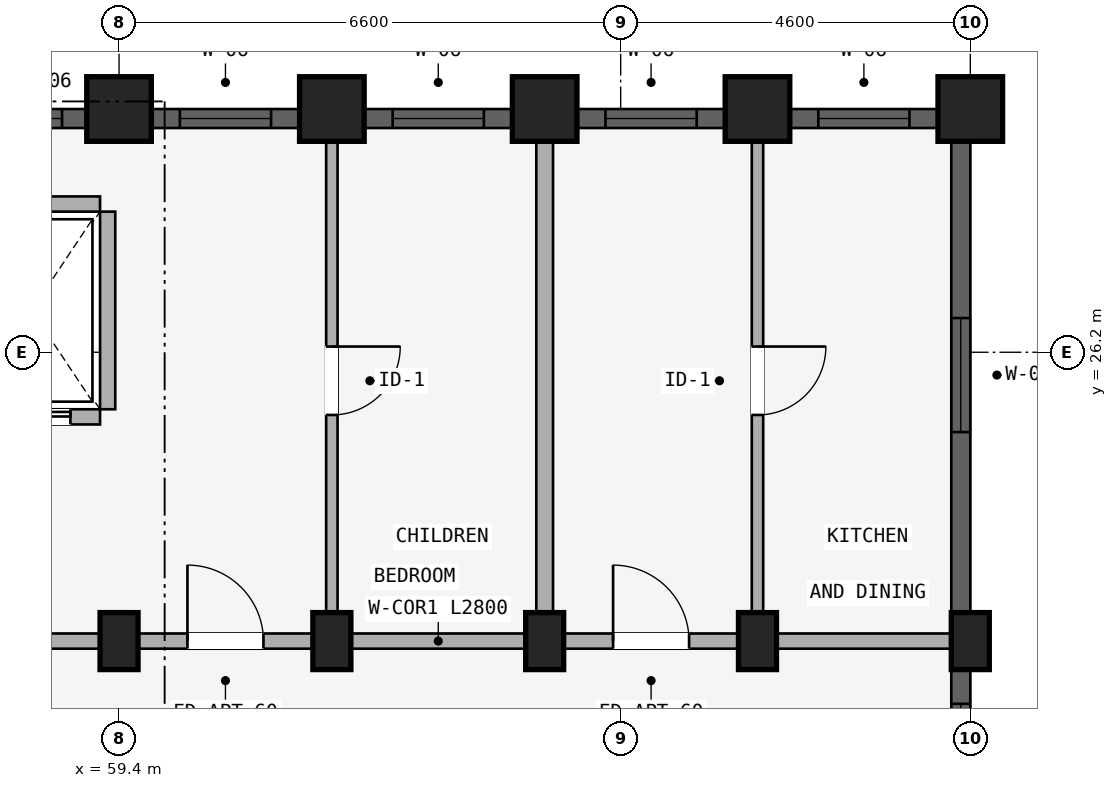
"""IFC4 building model, lengths in metres.
Left out: names, types, materials, properties, quantities, classifications, styles, units other than length and angle.
Written with IfcOpenShell. Run it as: python <this file> out.ifc"""

import sys

from ifc_helpers import new_model, si_unit, direction, frame, frame_2d, origin, origin_2d, place, context, subcontext, project, spatial, rectangle, extrude, element, fill, save


model = new_model("IFC4")
c1 = context("Model", 3, precision=1e-05, world=origin(), true_north=direction((0.0, 1.0)))
c2 = subcontext(c1, "Body", "Model", "MODEL_VIEW")
j1 = project(units=[si_unit("LENGTHUNIT", "METRE"), si_unit("PLANEANGLEUNIT", "RADIAN")], contexts=[c1])
p1 = place(None, origin())
s1 = spatial("IfcSite", under=j1, at=p1, CompositionType="ELEMENT")
p2 = place(p1, origin())
s2 = spatial("IfcBuilding", under=s1, at=p2, CompositionType="ELEMENT")
p3 = place(p2, frame((0.0, 0.0, 4.5)))
s3 = spatial("IfcBuildingStorey", under=s2, at=p3, CompositionType="ELEMENT", Elevation=4.5)
p4 = place(p3, frame((59.4, 29.4, 0.0), z_axis=(0.0, 0.0, 1.0), x_axis=(1.0, 0.0, 0.0)))
e1 = element("IfcColumn", 1, at=p4, inside=s3, PredefinedType="COLUMN", context=c2, shape_type="SweptSolid", body=[
    extrude(rectangle(XDim=0.85, YDim=0.85, at=origin_2d()), origin(), (0.0, 0.0, 1.0), 3.98),
])
p5 = place(p3, frame((59.4, 22.4, 0.0), z_axis=(0.0, 0.0, 1.0), x_axis=(1.0, 0.0, 0.0)))
e2 = element("IfcColumn", 2, at=p5, inside=s3, PredefinedType="COLUMN", context=c2, shape_type="SweptSolid", body=[
    extrude(rectangle(XDim=0.5, YDim=0.75, at=origin_2d()), origin(), (0.0, 0.0, 1.0), 3.98),
])
p6 = place(p3, frame((62.2, 29.4, 0.0), z_axis=(0.0, 0.0, 1.0), x_axis=(1.0, 0.0, 0.0)))
e3 = element("IfcColumn", 3, at=p6, inside=s3, PredefinedType="COLUMN", context=c2, shape_type="SweptSolid", body=[
    extrude(rectangle(XDim=0.85, YDim=0.85, at=origin_2d()), origin(), (0.0, 0.0, 1.0), 3.98),
])
p7 = place(p3, frame((62.2, 22.4, 0.0), z_axis=(0.0, 0.0, 1.0), x_axis=(1.0, 0.0, 0.0)))
e4 = element("IfcColumn", 4, at=p7, inside=s3, PredefinedType="COLUMN", context=c2, shape_type="SweptSolid", body=[
    extrude(rectangle(XDim=0.5, YDim=0.75, at=origin_2d()), origin(), (0.0, 0.0, 1.0), 3.98),
])
p8 = place(p3, frame((65.0, 29.4, 0.0), z_axis=(0.0, 0.0, 1.0), x_axis=(1.0, 0.0, 0.0)))
e5 = element("IfcColumn", 5, at=p8, inside=s3, PredefinedType="COLUMN", context=c2, shape_type="SweptSolid", body=[
    extrude(rectangle(XDim=0.85, YDim=0.85, at=origin_2d()), origin(), (0.0, 0.0, 1.0), 3.98),
])
p9 = place(p3, frame((65.0, 22.4, 0.0), z_axis=(0.0, 0.0, 1.0), x_axis=(1.0, 0.0, 0.0)))
e6 = element("IfcColumn", 6, at=p9, inside=s3, PredefinedType="COLUMN", context=c2, shape_type="SweptSolid", body=[
    extrude(rectangle(XDim=0.5, YDim=0.75, at=origin_2d()), origin(), (0.0, 0.0, 1.0), 3.98),
])
p10 = place(p3, frame((67.8, 29.4, 0.0), z_axis=(0.0, 0.0, 1.0), x_axis=(1.0, 0.0, 0.0)))
e7 = element("IfcColumn", 7, at=p10, inside=s3, PredefinedType="COLUMN", context=c2, shape_type="SweptSolid", body=[
    extrude(rectangle(XDim=0.85, YDim=0.85, at=origin_2d()), origin(), (0.0, 0.0, 1.0), 3.98),
])
p11 = place(p3, frame((67.8, 22.4, 0.0), z_axis=(0.0, 0.0, 1.0), x_axis=(1.0, 0.0, 0.0)))
e8 = element("IfcColumn", 8, at=p11, inside=s3, PredefinedType="COLUMN", context=c2, shape_type="SweptSolid", body=[
    extrude(rectangle(XDim=0.5, YDim=0.75, at=origin_2d()), origin(), (0.0, 0.0, 1.0), 3.98),
])
p12 = place(p3, frame((70.6, 29.4, 0.0), z_axis=(0.0, 0.0, 1.0), x_axis=(1.0, 0.0, 0.0)))
e9 = element("IfcColumn", 9, at=p12, inside=s3, PredefinedType="COLUMN", context=c2, shape_type="SweptSolid", body=[
    extrude(rectangle(XDim=0.85, YDim=0.85, at=origin_2d()), origin(), (0.0, 0.0, 1.0), 3.98),
])
p13 = place(p3, frame((70.6, 22.4, 0.0), z_axis=(0.0, 0.0, 1.0), x_axis=(1.0, 0.0, 0.0)))
e10 = element("IfcColumn", 10, at=p13, inside=s3, PredefinedType="COLUMN", context=c2, shape_type="SweptSolid", body=[
    extrude(rectangle(XDim=0.5, YDim=0.75, at=origin_2d()), origin(), (0.0, 0.0, 1.0), 3.98),
])
p14 = place(p3, frame((59.25, 28.05, 0.0), z_axis=(0.0, 0.0, 1.0), x_axis=(0.0, -1.0, 0.0)))
e11 = element("IfcWall", 11, at=p14, inside=s3, PredefinedType="STANDARD", context=c2, shape_type="SweptSolid", body=[
    extrude(rectangle(XDim=2.6, YDim=0.2, at=frame_2d((1.3, 0.0))), origin(), (0.0, 0.0, 1.0), 3.322),
])
p15 = place(p3, frame((57.35, 28.15, 0.0), z_axis=(0.0, 0.0, 1.0), x_axis=(1.0, 0.0, 0.0)))
e12 = element("IfcWall", 12, at=p15, inside=s3, PredefinedType="STANDARD", context=c2, shape_type="SweptSolid", body=[
    extrude(rectangle(XDim=1.8, YDim=0.2, at=frame_2d((0.9, 0.0))), origin(), (0.0, 0.0, 1.0), 3.98),
])
p16 = place(p3, frame((57.35, 25.35, 0.0), z_axis=(0.0, 0.0, 1.0), x_axis=(1.0, 0.0, 0.0)))
e13 = element("IfcWall", 13, at=p16, inside=s3, PredefinedType="STANDARD", context=c2, shape_type="SweptSolid", body=[
    extrude(rectangle(XDim=1.8, YDim=0.2, at=frame_2d((0.9, 0.0))), origin(), (0.0, 0.0, 1.0), 3.98),
])
p17 = place(p16, frame((0.39, 0.0, 0.0)))
e14 = element("IfcOpeningElement", 14, at=p17, cuts=e13, PredefinedType="OPENING", context=c2, shape_type="SweptSolid", body=[
    extrude(rectangle(XDim=1.02, YDim=2.15, at=frame_2d((0.51, 1.075))), frame((0.0, 0.11, 0.0), z_axis=(0.0, -1.0, 0.0), x_axis=(1.0, 0.0, 0.0)), (0.0, 0.0, 1.0), 0.22),
])
p18 = place(p3, frame((53.75, 22.4, 0.0), z_axis=(0.0, 0.0, 1.0), x_axis=(1.0, 0.0, 0.0)))
e15 = element("IfcWall", 15, at=p18, inside=s3, PredefinedType="STANDARD", context=c2, shape_type="SweptSolid", body=[
    extrude(rectangle(XDim=5.6, YDim=0.2, at=frame_2d((2.8, 0.0))), origin(), (0.0, 0.0, 1.0), 3.322),
])
p19 = place(p18, frame((1.91, 0.0, 0.0)))
e16 = element("IfcOpeningElement", 16, at=p19, cuts=e15, PredefinedType="OPENING", context=c2, shape_type="SweptSolid", body=[
    extrude(rectangle(XDim=1.22, YDim=2.15, at=frame_2d((0.61, 1.075))), frame((0.0, 0.11, 0.0), z_axis=(0.0, -1.0, 0.0), x_axis=(1.0, 0.0, 0.0)), (0.0, 0.0, 1.0), 0.22),
])
p20 = place(p3, frame((59.4, 22.4, 0.0), z_axis=(0.0, 0.0, 1.0), x_axis=(1.0, 0.0, 0.0)))
e17 = element("IfcWall", 17, at=p20, inside=s3, PredefinedType="STANDARD", context=c2, shape_type="SweptSolid", body=[
    extrude(rectangle(XDim=2.8, YDim=0.2, at=frame_2d((1.4, 0.0))), origin(), (0.0, 0.0, 1.0), 3.322),
])
p21 = place(p20, frame((0.9, 0.0, 0.0)))
e18 = element("IfcOpeningElement", 18, at=p21, cuts=e17, PredefinedType="OPENING", context=c2, shape_type="SweptSolid", body=[
    extrude(rectangle(XDim=1.0, YDim=2.15, at=frame_2d((0.5, 1.075))), frame((0.0, 0.11, 0.0), z_axis=(0.0, -1.0, 0.0), x_axis=(1.0, 0.0, 0.0)), (0.0, 0.0, 1.0), 0.22),
])
p22 = place(p3, frame((62.2, 22.4, 0.0), z_axis=(0.0, 0.0, 1.0), x_axis=(1.0, 0.0, 0.0)))
e19 = element("IfcWall", 19, at=p22, inside=s3, PredefinedType="STANDARD", context=c2, shape_type="SweptSolid", body=[
    extrude(rectangle(XDim=2.8, YDim=0.2, at=frame_2d((1.4, 0.0))), origin(), (0.0, 0.0, 1.0), 3.322),
])
p23 = place(p3, frame((65.0, 22.4, 0.0), z_axis=(0.0, 0.0, 1.0), x_axis=(1.0, 0.0, 0.0)))
e20 = element("IfcWall", 20, at=p23, inside=s3, PredefinedType="STANDARD", context=c2, shape_type="SweptSolid", body=[
    extrude(rectangle(XDim=2.8, YDim=0.2, at=frame_2d((1.4, 0.0))), origin(), (0.0, 0.0, 1.0), 3.322),
])
p24 = place(p23, frame((0.9, 0.0, 0.0)))
e21 = element("IfcOpeningElement", 21, at=p24, cuts=e20, PredefinedType="OPENING", context=c2, shape_type="SweptSolid", body=[
    extrude(rectangle(XDim=1.0, YDim=2.15, at=frame_2d((0.5, 1.075))), frame((0.0, 0.11, 0.0), z_axis=(0.0, -1.0, 0.0), x_axis=(1.0, 0.0, 0.0)), (0.0, 0.0, 1.0), 0.22),
])
p25 = place(p3, frame((67.8, 22.4, 0.0), z_axis=(0.0, 0.0, 1.0), x_axis=(1.0, 0.0, 0.0)))
e22 = element("IfcWall", 22, at=p25, inside=s3, PredefinedType="STANDARD", context=c2, shape_type="SweptSolid", body=[
    extrude(rectangle(XDim=2.8, YDim=0.2, at=frame_2d((1.4, 0.0))), origin(), (0.0, 0.0, 1.0), 3.322),
])
p26 = place(p3, frame((62.2, 29.2, 0.0), z_axis=(0.0, 0.0, 1.0), x_axis=(0.0, -1.0, 0.0)))
e23 = element("IfcWall", 23, at=p26, inside=s3, PredefinedType="PARTITIONING", context=c2, shape_type="SweptSolid", body=[
    extrude(rectangle(XDim=6.75, YDim=0.15, at=frame_2d((3.375, 0.0))), origin(), (0.0, 0.0, 1.0), 3.322),
])
p27 = place(p26, frame((2.925, 0.0, 0.0)))
e24 = element("IfcOpeningElement", 24, at=p27, cuts=e23, PredefinedType="OPENING", context=c2, shape_type="SweptSolid", body=[
    extrude(rectangle(XDim=0.9, YDim=2.1, at=frame_2d((0.45, 1.05))), frame((0.0, 0.085, 0.0), z_axis=(0.0, -1.0, 0.0), x_axis=(1.0, 0.0, 0.0)), (0.0, 0.0, 1.0), 0.17),
])
p28 = place(p3, frame((65.0, 29.2, 0.0), z_axis=(0.0, 0.0, 1.0), x_axis=(0.0, -1.0, 0.0)))
e25 = element("IfcWall", 25, at=p28, inside=s3, PredefinedType="STANDARD", context=c2, shape_type="SweptSolid", body=[
    extrude(rectangle(XDim=6.75, YDim=0.22, at=frame_2d((3.375, 0.0))), origin(), (0.0, 0.0, 1.0), 3.322),
])
p29 = place(p3, frame((67.8, 29.2, 0.0), z_axis=(0.0, 0.0, 1.0), x_axis=(0.0, -1.0, 0.0)))
e26 = element("IfcWall", 26, at=p29, inside=s3, PredefinedType="PARTITIONING", context=c2, shape_type="SweptSolid", body=[
    extrude(rectangle(XDim=6.75, YDim=0.15, at=frame_2d((3.375, 0.0))), origin(), (0.0, 0.0, 1.0), 3.322),
])
p30 = place(p29, frame((2.925, 0.0, 0.0)))
e27 = element("IfcOpeningElement", 27, at=p30, cuts=e26, PredefinedType="OPENING", context=c2, shape_type="SweptSolid", body=[
    extrude(rectangle(XDim=0.9, YDim=2.1, at=frame_2d((0.45, 1.05))), frame((0.0, 0.085, 0.0), z_axis=(0.0, -1.0, 0.0), x_axis=(1.0, 0.0, 0.0)), (0.0, 0.0, 1.0), 0.17),
])
p31 = place(p3, frame((56.628, 29.275, 0.0), z_axis=(0.0, 0.0, 1.0), x_axis=(1.0, 0.0, 0.0)))
e28 = element("IfcWall", 28, at=p31, inside=s3, PredefinedType="STANDARD", context=c2, shape_type="SweptSolid", body=[
    extrude(rectangle(XDim=2.422, YDim=0.25, at=frame_2d((1.211, 0.0))), origin(), (0.0, 0.0, 1.0), 3.522),
])
p32 = place(p31, frame((0.822, 0.0, 0.88)))
e29 = element("IfcOpeningElement", 29, at=p32, cuts=e28, PredefinedType="OPENING", context=c2, shape_type="SweptSolid", body=[
    extrude(rectangle(XDim=1.2, YDim=1.5, at=frame_2d((0.6, 0.75))), frame((0.0, 0.135, 0.0), z_axis=(0.0, -1.0, 0.0), x_axis=(1.0, 0.0, 0.0)), (0.0, 0.0, 1.0), 0.27),
])
p33 = place(p3, frame((59.82, 29.275, 0.0), z_axis=(0.0, 0.0, 1.0), x_axis=(1.0, 0.0, 0.0)))
e30 = element("IfcWall", 30, at=p33, inside=s3, PredefinedType="STANDARD", context=c2, shape_type="SweptSolid", body=[
    extrude(rectangle(XDim=1.96, YDim=0.25, at=frame_2d((0.98, 0.0))), origin(), (0.0, 0.0, 1.0), 3.522),
])
p34 = place(p33, frame((0.38, 0.0, 0.88)))
e31 = element("IfcOpeningElement", 31, at=p34, cuts=e30, PredefinedType="OPENING", context=c2, shape_type="SweptSolid", body=[
    extrude(rectangle(XDim=1.2, YDim=1.5, at=frame_2d((0.6, 0.75))), frame((0.0, 0.135, 0.0), z_axis=(0.0, -1.0, 0.0), x_axis=(1.0, 0.0, 0.0)), (0.0, 0.0, 1.0), 0.27),
])
p35 = place(p3, frame((62.62, 29.275, 0.0), z_axis=(0.0, 0.0, 1.0), x_axis=(1.0, 0.0, 0.0)))
e32 = element("IfcWall", 32, at=p35, inside=s3, PredefinedType="STANDARD", context=c2, shape_type="SweptSolid", body=[
    extrude(rectangle(XDim=1.96, YDim=0.25, at=frame_2d((0.98, 0.0))), origin(), (0.0, 0.0, 1.0), 3.522),
])
p36 = place(p35, frame((0.38, 0.0, 0.88)))
e33 = element("IfcOpeningElement", 33, at=p36, cuts=e32, PredefinedType="OPENING", context=c2, shape_type="SweptSolid", body=[
    extrude(rectangle(XDim=1.2, YDim=1.5, at=frame_2d((0.6, 0.75))), frame((0.0, 0.135, 0.0), z_axis=(0.0, -1.0, 0.0), x_axis=(1.0, 0.0, 0.0)), (0.0, 0.0, 1.0), 0.27),
])
p37 = place(p3, frame((65.42, 29.275, 0.0), z_axis=(0.0, 0.0, 1.0), x_axis=(1.0, 0.0, 0.0)))
e34 = element("IfcWall", 34, at=p37, inside=s3, PredefinedType="STANDARD", context=c2, shape_type="SweptSolid", body=[
    extrude(rectangle(XDim=1.96, YDim=0.25, at=frame_2d((0.98, 0.0))), origin(), (0.0, 0.0, 1.0), 3.522),
])
p38 = place(p37, frame((0.38, 0.0, 0.88)))
e35 = element("IfcOpeningElement", 35, at=p38, cuts=e34, PredefinedType="OPENING", context=c2, shape_type="SweptSolid", body=[
    extrude(rectangle(XDim=1.2, YDim=1.5, at=frame_2d((0.6, 0.75))), frame((0.0, 0.135, 0.0), z_axis=(0.0, -1.0, 0.0), x_axis=(1.0, 0.0, 0.0)), (0.0, 0.0, 1.0), 0.27),
])
p39 = place(p3, frame((68.22, 29.275, 0.0), z_axis=(0.0, 0.0, 1.0), x_axis=(1.0, 0.0, 0.0)))
e36 = element("IfcWall", 36, at=p39, inside=s3, PredefinedType="STANDARD", context=c2, shape_type="SweptSolid", body=[
    extrude(rectangle(XDim=1.96, YDim=0.25, at=frame_2d((0.98, 0.0))), origin(), (0.0, 0.0, 1.0), 3.522),
])
p40 = place(p39, frame((0.38, 0.0, 0.88)))
e37 = element("IfcOpeningElement", 37, at=p40, cuts=e36, PredefinedType="OPENING", context=c2, shape_type="SweptSolid", body=[
    extrude(rectangle(XDim=1.2, YDim=1.5, at=frame_2d((0.6, 0.75))), frame((0.0, 0.135, 0.0), z_axis=(0.0, -1.0, 0.0), x_axis=(1.0, 0.0, 0.0)), (0.0, 0.0, 1.0), 0.27),
])
p41 = place(p3, frame((70.475, 28.98, 0.0), z_axis=(0.0, 0.0, 1.0), x_axis=(0.0, -1.0, 0.0)))
e38 = element("IfcWall", 38, at=p41, inside=s3, PredefinedType="STANDARD", context=c2, shape_type="SweptSolid", body=[
    extrude(rectangle(XDim=6.201, YDim=0.25, at=frame_2d((3.101, 0.0))), origin(), (0.0, 0.0, 1.0), 3.322),
])
p42 = place(p41, frame((2.33, 0.0, 0.88)))
e39 = element("IfcOpeningElement", 39, at=p42, cuts=e38, PredefinedType="OPENING", context=c2, shape_type="SweptSolid", body=[
    extrude(rectangle(XDim=1.5, YDim=1.65, at=frame_2d((0.75, 0.825))), frame((0.0, 0.135, 0.0), z_axis=(0.0, -1.0, 0.0), x_axis=(1.0, 0.0, 0.0)), (0.0, 0.0, 1.0), 0.27),
])
p43 = place(p3, frame((70.475, 22.021, 0.0), z_axis=(0.0, 0.0, 1.0), x_axis=(0.0, -1.0, 0.0)))
e40 = element("IfcWall", 40, at=p43, inside=s3, PredefinedType="STANDARD", context=c2, shape_type="SweptSolid", body=[
    extrude(rectangle(XDim=1.643, YDim=0.25, at=frame_2d((0.822, 0.0))), origin(), (0.0, 0.0, 1.0), 3.322),
])
p44 = place(p43, frame((0.447, 0.0, 0.88)))
e41 = element("IfcOpeningElement", 41, at=p44, cuts=e40, PredefinedType="OPENING", context=c2, shape_type="SweptSolid", body=[
    extrude(rectangle(XDim=0.75, YDim=1.05, at=frame_2d((0.375, 0.525))), frame((0.0, 0.135, 0.0), z_axis=(0.0, -1.0, 0.0), x_axis=(1.0, 0.0, 0.0)), (0.0, 0.0, 1.0), 0.27),
])
p45 = place(p32, origin())
e42 = element("IfcWindow", 42, at=p45, inside=s3, PartitioningType="SINGLE_PANEL", PredefinedType="WINDOW", context=c2, shape_type="SweptSolid", body=[
    extrude(rectangle(XDim=1.2, YDim=1.5, at=frame_2d((0.6, 0.75))), frame((0.0, 0.03, 0.0), z_axis=(0.0, -1.0, 0.0), x_axis=(1.0, 0.0, 0.0)), (0.0, 0.0, 1.0), 0.06),
])
fill(e29, e42)
p46 = place(p34, origin())
e43 = element("IfcWindow", 43, at=p46, inside=s3, PartitioningType="SINGLE_PANEL", PredefinedType="WINDOW", context=c2, shape_type="SweptSolid", body=[
    extrude(rectangle(XDim=1.2, YDim=1.5, at=frame_2d((0.6, 0.75))), frame((0.0, 0.03, 0.0), z_axis=(0.0, -1.0, 0.0), x_axis=(1.0, 0.0, 0.0)), (0.0, 0.0, 1.0), 0.06),
])
fill(e31, e43)
p47 = place(p36, origin())
e44 = element("IfcWindow", 44, at=p47, inside=s3, PartitioningType="SINGLE_PANEL", PredefinedType="WINDOW", context=c2, shape_type="SweptSolid", body=[
    extrude(rectangle(XDim=1.2, YDim=1.5, at=frame_2d((0.6, 0.75))), frame((0.0, 0.03, 0.0), z_axis=(0.0, -1.0, 0.0), x_axis=(1.0, 0.0, 0.0)), (0.0, 0.0, 1.0), 0.06),
])
fill(e33, e44)
p48 = place(p38, origin())
e45 = element("IfcWindow", 45, at=p48, inside=s3, PartitioningType="SINGLE_PANEL", PredefinedType="WINDOW", context=c2, shape_type="SweptSolid", body=[
    extrude(rectangle(XDim=1.2, YDim=1.5, at=frame_2d((0.6, 0.75))), frame((0.0, 0.03, 0.0), z_axis=(0.0, -1.0, 0.0), x_axis=(1.0, 0.0, 0.0)), (0.0, 0.0, 1.0), 0.06),
])
fill(e35, e45)
p49 = place(p40, origin())
e46 = element("IfcWindow", 46, at=p49, inside=s3, PartitioningType="SINGLE_PANEL", PredefinedType="WINDOW", context=c2, shape_type="SweptSolid", body=[
    extrude(rectangle(XDim=1.2, YDim=1.5, at=frame_2d((0.6, 0.75))), frame((0.0, 0.03, 0.0), z_axis=(0.0, -1.0, 0.0), x_axis=(1.0, 0.0, 0.0)), (0.0, 0.0, 1.0), 0.06),
])
fill(e37, e46)
p50 = place(p42, origin())
e47 = element("IfcWindow", 47, at=p50, inside=s3, PartitioningType="DOUBLE_PANEL_VERTICAL", PredefinedType="WINDOW", context=c2, shape_type="SweptSolid", body=[
    extrude(rectangle(XDim=1.5, YDim=1.65, at=frame_2d((0.75, 0.825))), frame((0.0, 0.03, 0.0), z_axis=(0.0, -1.0, 0.0), x_axis=(1.0, 0.0, 0.0)), (0.0, 0.0, 1.0), 0.06),
])
fill(e39, e47)
p51 = place(p44, origin())
e48 = element("IfcWindow", 48, at=p51, inside=s3, PartitioningType="SINGLE_PANEL", PredefinedType="WINDOW", context=c2, shape_type="SweptSolid", body=[
    extrude(rectangle(XDim=0.75, YDim=1.05, at=frame_2d((0.375, 0.525))), frame((0.0, 0.03, 0.0), z_axis=(0.0, -1.0, 0.0), x_axis=(1.0, 0.0, 0.0)), (0.0, 0.0, 1.0), 0.06),
])
fill(e41, e48)
p52 = place(p17, origin())
e49 = element("IfcDoor", 49, at=p52, inside=s3, OperationType="SLIDING_TO_RIGHT", PredefinedType="DOOR", context=c2, shape_type="SweptSolid", body=[
    extrude(rectangle(XDim=1.02, YDim=2.15, at=frame_2d((0.51, 1.075))), frame((0.0, 0.025, 0.0), z_axis=(0.0, -1.0, 0.0), x_axis=(1.0, 0.0, 0.0)), (0.0, 0.0, 1.0), 0.05),
])
fill(e14, e49)
p53 = place(p21, origin())
e50 = element("IfcDoor", 50, at=p53, inside=s3, OperationType="SINGLE_SWING_LEFT", PredefinedType="DOOR", context=c2, shape_type="SweptSolid", body=[
    extrude(rectangle(XDim=1.0, YDim=2.15, at=frame_2d((0.5, 1.075))), frame((0.0, 0.025, 0.0), z_axis=(0.0, -1.0, 0.0), x_axis=(1.0, 0.0, 0.0)), (0.0, 0.0, 1.0), 0.05),
])
fill(e18, e50)
p54 = place(p24, origin())
e51 = element("IfcDoor", 51, at=p54, inside=s3, OperationType="SINGLE_SWING_LEFT", PredefinedType="DOOR", context=c2, shape_type="SweptSolid", body=[
    extrude(rectangle(XDim=1.0, YDim=2.15, at=frame_2d((0.5, 1.075))), frame((0.0, 0.025, 0.0), z_axis=(0.0, -1.0, 0.0), x_axis=(1.0, 0.0, 0.0)), (0.0, 0.0, 1.0), 0.05),
])
fill(e21, e51)
p55 = place(p27, frame((0.9, 0.0, 0.0), z_axis=(0.0, 0.0, 1.0), x_axis=(-1.0, 0.0, 0.0)))
e52 = element("IfcDoor", 52, at=p55, inside=s3, OperationType="SINGLE_SWING_RIGHT", PredefinedType="DOOR", context=c2, shape_type="SweptSolid", body=[
    extrude(rectangle(XDim=0.9, YDim=2.1, at=frame_2d((0.45, 1.05))), frame((0.0, 0.025, 0.0), z_axis=(0.0, -1.0, 0.0), x_axis=(1.0, 0.0, 0.0)), (0.0, 0.0, 1.0), 0.05),
])
fill(e24, e52)
p56 = place(p30, origin())
e53 = element("IfcDoor", 53, at=p56, inside=s3, OperationType="SINGLE_SWING_LEFT", PredefinedType="DOOR", context=c2, shape_type="SweptSolid", body=[
    extrude(rectangle(XDim=0.9, YDim=2.1, at=frame_2d((0.45, 1.05))), frame((0.0, 0.025, 0.0), z_axis=(0.0, -1.0, 0.0), x_axis=(1.0, 0.0, 0.0)), (0.0, 0.0, 1.0), 0.05),
])
fill(e27, e53)
save(model, sys.argv[1])
